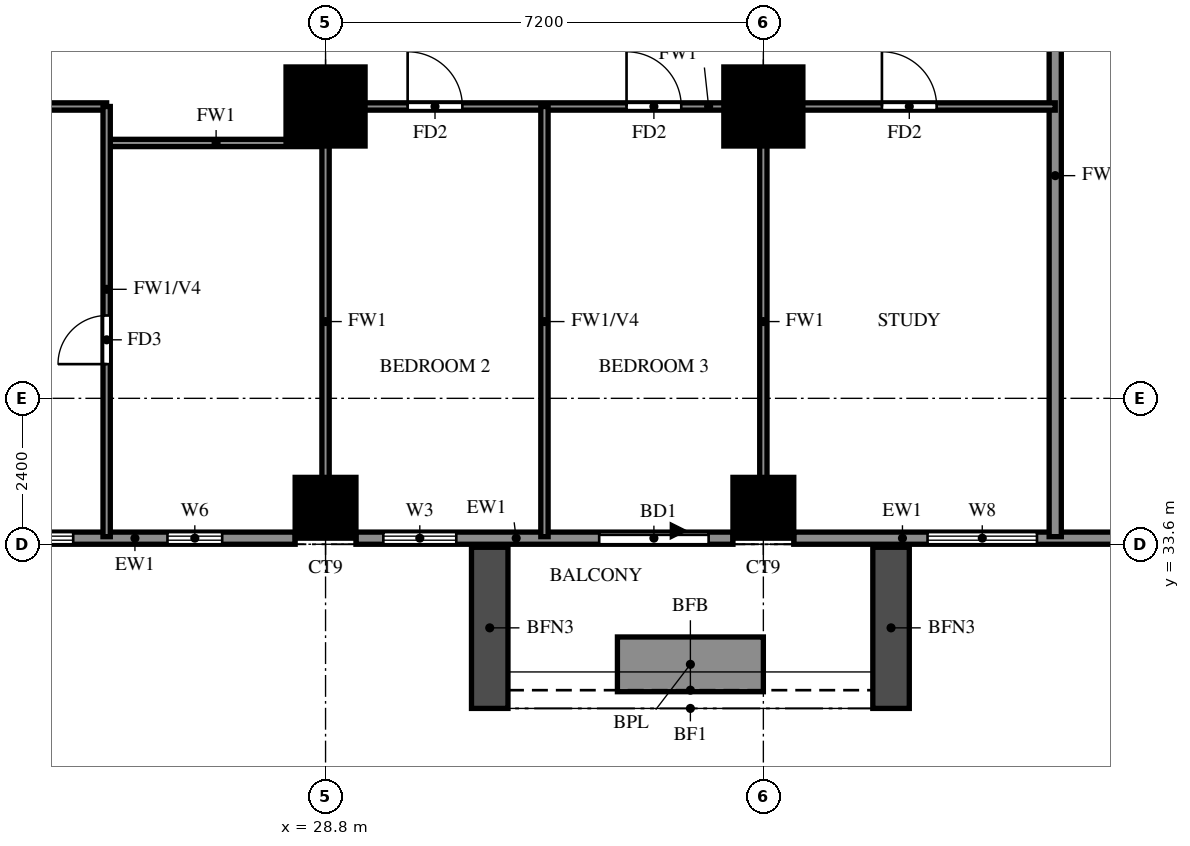
"""IFC4 building model, lengths in metres.
Left out: names, types, materials, properties, quantities, classifications, styles, units other than length and angle.
Written with IfcOpenShell. Run it as: python <this file> out.ifc"""

import sys

from ifc_helpers import new_model, si_unit, direction, frame, frame_2d, origin, origin_2d, place, context, subcontext, project, spatial, rectangle, extrude, source, transform, mapped, element, fill, save


model = new_model("IFC4")
c1 = context("Model", 3, precision=1e-05, world=origin(), true_north=direction((0.0, 1.0)))
c2 = subcontext(c1, "Body", "Model", "MODEL_VIEW")
j1 = project(units=[si_unit("LENGTHUNIT", "METRE"), si_unit("PLANEANGLEUNIT", "RADIAN")], contexts=[c1])
p1 = place(None, origin())
s1 = spatial("IfcSite", under=j1, at=p1, CompositionType="ELEMENT")
p2 = place(p1, origin())
s2 = spatial("IfcBuilding", under=s1, at=p2, CompositionType="ELEMENT")
p3 = place(p2, frame((0.0, 0.0, 79.5)))
s3 = spatial("IfcBuildingStorey", under=s2, at=p3, CompositionType="ELEMENT", Elevation=79.5)
m1 = source(origin(), c2, "Body", "SweptSolid", [
    extrude(rectangle(XDim=1.0, YDim=1.0, at=origin_2d()), origin(), (0.0, 0.0, 1.0), 3.18),
])
for number, where, z_axis, x_axis in (
    (1, (28.8, 34.2, 0.0), (0.0, 0.0, 1.0), (1.0, 0.0, 0.0)),
    (2, (36.0, 34.2, 0.0), (0.0, 0.0, 1.0), (1.0, 0.0, 0.0)),
):
    element("IfcColumn", number, at=place(p3, frame(where, z_axis=z_axis, x_axis=x_axis)), inside=s3, PredefinedType="COLUMN", context=c2, shape_type="MappedRepresentation", body=[
        mapped(m1, transform((0.0, 0.0, 0.0))),
    ])
m2 = source(origin(), c2, "Body", "SweptSolid", [
    extrude(rectangle(XDim=1.3, YDim=1.3, at=origin_2d()), origin(), (0.0, 0.0, 1.0), 3.18),
])
for number, where, z_axis, x_axis in (
    (3, (28.8, 40.8, 0.0), (0.0, 0.0, 1.0), (1.0, 0.0, 0.0)),
    (4, (36.0, 40.8, 0.0), (0.0, 0.0, 1.0), (1.0, 0.0, 0.0)),
):
    element("IfcColumn", number, at=place(p3, frame(where, z_axis=z_axis, x_axis=x_axis)), inside=s3, PredefinedType="COLUMN", context=c2, shape_type="MappedRepresentation", body=[
        mapped(m2, transform((0.0, 0.0, 0.0))),
    ])
p4 = place(p3, frame((22.1, 33.7, 0.0), z_axis=(0.0, 0.0, 1.0), x_axis=(1.0, 0.0, 0.0)))
e5 = element("IfcWall", 5, at=p4, inside=s3, PredefinedType="SOLIDWALL", context=c2, shape_type="SweptSolid", body=[
    extrude(rectangle(XDim=6.2, YDim=0.2, at=frame_2d((3.1, 0.0))), origin(), (0.0, 0.0, 1.0), 3.18),
])
p5 = place(p4, frame((0.75, 0.0, 0.6)))
e6 = element("IfcOpeningElement", 6, at=p5, cuts=e5, PredefinedType="OPENING", context=c2, shape_type="SweptSolid", body=[
    extrude(rectangle(XDim=1.8, YDim=2.4, at=frame_2d((0.9, 1.2))), frame((0.0, 0.11, 0.0), z_axis=(0.0, -1.0, 0.0), x_axis=(1.0, 0.0, 0.0)), (0.0, 0.0, 1.0), 0.22),
])
p6 = place(p4, frame((4.1, 0.0, 1.5)))
e7 = element("IfcOpeningElement", 7, at=p6, cuts=e5, PredefinedType="OPENING", context=c2, shape_type="SweptSolid", body=[
    extrude(rectangle(XDim=0.9, YDim=0.9, at=frame_2d((0.45, 0.45))), frame((0.0, 0.11, 0.0), z_axis=(0.0, -1.0, 0.0), x_axis=(1.0, 0.0, 0.0)), (0.0, 0.0, 1.0), 0.22),
])
p7 = place(p3, frame((29.3, 33.7, 0.0), z_axis=(0.0, 0.0, 1.0), x_axis=(1.0, 0.0, 0.0)))
e8 = element("IfcWall", 8, at=p7, inside=s3, PredefinedType="SOLIDWALL", context=c2, shape_type="SweptSolid", body=[
    extrude(rectangle(XDim=6.2, YDim=0.2, at=frame_2d((3.1, 0.0))), origin(), (0.0, 0.0, 1.0), 3.18),
])
p8 = place(p7, frame((4.0, 0.0, 0.0)))
e9 = element("IfcOpeningElement", 9, at=p8, cuts=e8, PredefinedType="OPENING", context=c2, shape_type="SweptSolid", body=[
    extrude(rectangle(XDim=1.8, YDim=2.4, at=frame_2d((0.9, 1.2))), frame((0.0, 0.11, 0.0), z_axis=(0.0, -1.0, 0.0), x_axis=(1.0, 0.0, 0.0)), (0.0, 0.0, 1.0), 0.22),
])
p9 = place(p7, frame((0.45, 0.0, 0.6)))
e10 = element("IfcOpeningElement", 10, at=p9, cuts=e8, PredefinedType="OPENING", context=c2, shape_type="SweptSolid", body=[
    extrude(rectangle(XDim=1.2, YDim=2.4, at=frame_2d((0.6, 1.2))), frame((0.0, 0.11, 0.0), z_axis=(0.0, -1.0, 0.0), x_axis=(1.0, 0.0, 0.0)), (0.0, 0.0, 1.0), 0.22),
])
p10 = place(p3, frame((36.5, 33.7, 0.0), z_axis=(0.0, 0.0, 1.0), x_axis=(1.0, 0.0, 0.0)))
e11 = element("IfcWall", 11, at=p10, inside=s3, PredefinedType="SOLIDWALL", context=c2, shape_type="SweptSolid", body=[
    extrude(rectangle(XDim=5.5, YDim=0.2, at=frame_2d((2.75, 0.0))), origin(), (0.0, 0.0, 1.0), 3.18),
])
p11 = place(p10, frame((2.2, 0.0, 0.6)))
e12 = element("IfcOpeningElement", 12, at=p11, cuts=e11, PredefinedType="OPENING", context=c2, shape_type="SweptSolid", body=[
    extrude(rectangle(XDim=1.8, YDim=2.4, at=frame_2d((0.9, 1.2))), frame((0.0, 0.11, 0.0), z_axis=(0.0, -1.0, 0.0), x_axis=(1.0, 0.0, 0.0)), (0.0, 0.0, 1.0), 0.22),
])
for number, where, z_axis, x_axis in (
    (13, (31.5, 33.55, 0.0), (0.0, 0.0, 1.0), (0.0, -1.0, 0.0)),
    (14, (38.1, 33.55, 0.0), (0.0, 0.0, 1.0), (0.0, -1.0, 0.0)),
):
    element("IfcWall", number, at=place(p3, frame(where, z_axis=z_axis, x_axis=x_axis)), inside=s3, PredefinedType="SOLIDWALL", context=c2, shape_type="SweptSolid", body=[
        extrude(rectangle(XDim=2.65, YDim=0.6, at=frame_2d((1.325, 0.0))), origin(), (0.0, 0.0, 1.0), 2.85),
    ])
p12 = place(p3, frame((33.6, 31.625, 0.0), z_axis=(0.0, 0.0, 1.0), x_axis=(1.0, 0.0, 0.0)))
e15 = element("IfcWall", 15, at=p12, inside=s3, PredefinedType="SOLIDWALL", context=c2, shape_type="SweptSolid", body=[
    extrude(rectangle(XDim=2.4, YDim=0.9, at=frame_2d((1.2, 0.0))), origin(), (0.0, 0.0, 1.0), 0.9),
])
p13 = place(p3, frame((40.8, 33.725, 0.0), z_axis=(0.0, 0.0, 1.0), x_axis=(0.0, 1.0, 0.0)))
e16 = element("IfcWall", 16, at=p13, inside=s3, PredefinedType="SOLIDWALL", context=c2, shape_type="SweptSolid", body=[
    extrude(rectangle(XDim=11.875, YDim=0.2, at=frame_2d((5.938, 0.0))), origin(), (0.0, 0.0, 1.0), 2.28),
])
p14 = place(p3, frame((25.2, 40.2, 0.0), z_axis=(0.0, 0.0, 1.0), x_axis=(1.0, 0.0, 0.0)))
e17 = element("IfcWall", 17, at=p14, inside=s3, PredefinedType="PARTITIONING", context=c2, shape_type="SweptSolid", body=[
    extrude(rectangle(XDim=3.6, YDim=0.12, at=frame_2d((1.8, 0.0))), origin(), (0.0, 0.0, 1.0), 3.18),
])
p15 = place(p3, frame((21.6, 40.8, 0.0), z_axis=(0.0, 0.0, 1.0), x_axis=(1.0, 0.0, 0.0)))
e18 = element("IfcWall", 18, at=p15, inside=s3, PredefinedType="PARTITIONING", context=c2, shape_type="SweptSolid", body=[
    extrude(rectangle(XDim=3.6, YDim=0.12, at=frame_2d((1.8, 0.0))), origin(), (0.0, 0.0, 1.0), 3.18),
])
p16 = place(p15, frame((1.35, 0.0, 0.0)))
e19 = element("IfcOpeningElement", 19, at=p16, cuts=e18, PredefinedType="OPENING", context=c2, shape_type="SweptSolid", body=[
    extrude(rectangle(XDim=0.9, YDim=2.1, at=frame_2d((0.45, 1.05))), frame((0.0, 0.07, 0.0), z_axis=(0.0, -1.0, 0.0), x_axis=(1.0, 0.0, 0.0)), (0.0, 0.0, 1.0), 0.14),
])
p17 = place(p3, frame((28.8, 40.8, 0.0), z_axis=(0.0, 0.0, 1.0), x_axis=(1.0, 0.0, 0.0)))
e20 = element("IfcWall", 20, at=p17, inside=s3, PredefinedType="PARTITIONING", context=c2, shape_type="SweptSolid", body=[
    extrude(rectangle(XDim=12.0, YDim=0.12, at=frame_2d((6.0, 0.0))), origin(), (0.0, 0.0, 1.0), 3.18),
])
p18 = place(p17, frame((1.35, 0.0, 0.0)))
e21 = element("IfcOpeningElement", 21, at=p18, cuts=e20, PredefinedType="OPENING", context=c2, shape_type="SweptSolid", body=[
    extrude(rectangle(XDim=0.9, YDim=2.1, at=frame_2d((0.45, 1.05))), frame((0.0, 0.07, 0.0), z_axis=(0.0, -1.0, 0.0), x_axis=(1.0, 0.0, 0.0)), (0.0, 0.0, 1.0), 0.14),
])
p19 = place(p17, frame((4.95, 0.0, 0.0)))
e22 = element("IfcOpeningElement", 22, at=p19, cuts=e20, PredefinedType="OPENING", context=c2, shape_type="SweptSolid", body=[
    extrude(rectangle(XDim=0.9, YDim=2.1, at=frame_2d((0.45, 1.05))), frame((0.0, 0.07, 0.0), z_axis=(0.0, -1.0, 0.0), x_axis=(1.0, 0.0, 0.0)), (0.0, 0.0, 1.0), 0.14),
])
p20 = place(p17, frame((9.15, 0.0, 0.0)))
e23 = element("IfcOpeningElement", 23, at=p20, cuts=e20, PredefinedType="OPENING", context=c2, shape_type="SweptSolid", body=[
    extrude(rectangle(XDim=0.9, YDim=2.1, at=frame_2d((0.45, 1.05))), frame((0.0, 0.07, 0.0), z_axis=(0.0, -1.0, 0.0), x_axis=(1.0, 0.0, 0.0)), (0.0, 0.0, 1.0), 0.14),
])
p21 = place(p3, frame((25.2, 33.725, 0.0), z_axis=(0.0, 0.0, 1.0), x_axis=(0.0, 1.0, 0.0)))
e24 = element("IfcWall", 24, at=p21, inside=s3, PredefinedType="PARTITIONING", context=c2, shape_type="SweptSolid", body=[
    extrude(rectangle(XDim=7.075, YDim=0.12, at=frame_2d((3.538, 0.0))), origin(), (0.0, 0.0, 1.0), 2.28),
])
p22 = place(p21, frame((2.837, 0.0, 0.0)))
e25 = element("IfcOpeningElement", 25, at=p22, cuts=e24, PredefinedType="OPENING", context=c2, shape_type="SweptSolid", body=[
    extrude(rectangle(XDim=0.8, YDim=2.1, at=frame_2d((0.4, 1.05))), frame((0.0, 0.07, 0.0), z_axis=(0.0, -1.0, 0.0), x_axis=(1.0, 0.0, 0.0)), (0.0, 0.0, 1.0), 0.14),
])
p23 = place(p3, frame((28.8, 33.725, 0.0), z_axis=(0.0, 0.0, 1.0), x_axis=(0.0, 1.0, 0.0)))
e26 = element("IfcWall", 26, at=p23, inside=s3, PredefinedType="PARTITIONING", context=c2, shape_type="SweptSolid", body=[
    extrude(rectangle(XDim=7.075, YDim=0.12, at=frame_2d((3.538, 0.0))), origin(), (0.0, 0.0, 1.0), 3.18),
])
p24 = place(p3, frame((32.4, 33.725, 0.0), z_axis=(0.0, 0.0, 1.0), x_axis=(0.0, 1.0, 0.0)))
e27 = element("IfcWall", 27, at=p24, inside=s3, PredefinedType="PARTITIONING", context=c2, shape_type="SweptSolid", body=[
    extrude(rectangle(XDim=7.075, YDim=0.12, at=frame_2d((3.538, 0.0))), origin(), (0.0, 0.0, 1.0), 2.28),
])
p25 = place(p3, frame((36.0, 33.725, 0.0), z_axis=(0.0, 0.0, 1.0), x_axis=(0.0, 1.0, 0.0)))
e28 = element("IfcWall", 28, at=p25, inside=s3, PredefinedType="PARTITIONING", context=c2, shape_type="SweptSolid", body=[
    extrude(rectangle(XDim=7.075, YDim=0.12, at=frame_2d((3.538, 0.0))), origin(), (0.0, 0.0, 1.0), 3.18),
])
p26 = place(p5, origin())
e29 = element("IfcWindow", 29, at=p26, inside=s3, PartitioningType="DOUBLE_PANEL_VERTICAL", PredefinedType="WINDOW", context=c2, shape_type="SweptSolid", body=[
    extrude(rectangle(XDim=1.8, YDim=2.4, at=frame_2d((0.9, 1.2))), frame((0.0, 0.03, 0.0), z_axis=(0.0, -1.0, 0.0), x_axis=(1.0, 0.0, 0.0)), (0.0, 0.0, 1.0), 0.06),
])
fill(e6, e29)
p27 = place(p6, origin())
e30 = element("IfcWindow", 30, at=p27, inside=s3, PartitioningType="SINGLE_PANEL", PredefinedType="WINDOW", context=c2, shape_type="SweptSolid", body=[
    extrude(rectangle(XDim=0.9, YDim=0.9, at=frame_2d((0.45, 0.45))), frame((0.0, 0.03, 0.0), z_axis=(0.0, -1.0, 0.0), x_axis=(1.0, 0.0, 0.0)), (0.0, 0.0, 1.0), 0.06),
])
fill(e7, e30)
p28 = place(p8, origin())
e31 = element("IfcDoor", 31, at=p28, inside=s3, OperationType="DOUBLE_DOOR_SLIDING", PredefinedType="DOOR", context=c2, shape_type="SweptSolid", body=[
    extrude(rectangle(XDim=1.8, YDim=2.4, at=frame_2d((0.9, 1.2))), frame((0.0, 0.025, 0.0), z_axis=(0.0, -1.0, 0.0), x_axis=(1.0, 0.0, 0.0)), (0.0, 0.0, 1.0), 0.05),
])
fill(e9, e31)
p29 = place(p9, origin())
e32 = element("IfcWindow", 32, at=p29, inside=s3, PartitioningType="SINGLE_PANEL", PredefinedType="WINDOW", context=c2, shape_type="SweptSolid", body=[
    extrude(rectangle(XDim=1.2, YDim=2.4, at=frame_2d((0.6, 1.2))), frame((0.0, 0.03, 0.0), z_axis=(0.0, -1.0, 0.0), x_axis=(1.0, 0.0, 0.0)), (0.0, 0.0, 1.0), 0.06),
])
fill(e10, e32)
p30 = place(p11, origin())
e33 = element("IfcWindow", 33, at=p30, inside=s3, PartitioningType="DOUBLE_PANEL_VERTICAL", PredefinedType="WINDOW", context=c2, shape_type="SweptSolid", body=[
    extrude(rectangle(XDim=1.8, YDim=2.4, at=frame_2d((0.9, 1.2))), frame((0.0, 0.03, 0.0), z_axis=(0.0, -1.0, 0.0), x_axis=(1.0, 0.0, 0.0)), (0.0, 0.0, 1.0), 0.06),
])
fill(e12, e33)
p31 = place(p22, origin())
e34 = element("IfcDoor", 34, at=p31, inside=s3, OperationType="SINGLE_SWING_LEFT", PredefinedType="DOOR", context=c2, shape_type="SweptSolid", body=[
    extrude(rectangle(XDim=0.8, YDim=2.1, at=frame_2d((0.4, 1.05))), frame((0.0, 0.025, 0.0), z_axis=(0.0, -1.0, 0.0), x_axis=(1.0, 0.0, 0.0)), (0.0, 0.0, 1.0), 0.05),
])
fill(e25, e34)
p32 = place(p18, origin())
e35 = element("IfcDoor", 35, at=p32, inside=s3, OperationType="SINGLE_SWING_RIGHT", PredefinedType="DOOR", context=c2, shape_type="SweptSolid", body=[
    extrude(rectangle(XDim=0.9, YDim=2.1, at=frame_2d((0.45, 1.05))), frame((0.0, 0.025, 0.0), z_axis=(0.0, -1.0, 0.0), x_axis=(1.0, 0.0, 0.0)), (0.0, 0.0, 1.0), 0.05),
])
fill(e21, e35)
p33 = place(p19, origin())
e36 = element("IfcDoor", 36, at=p33, inside=s3, OperationType="SINGLE_SWING_LEFT", PredefinedType="DOOR", context=c2, shape_type="SweptSolid", body=[
    extrude(rectangle(XDim=0.9, YDim=2.1, at=frame_2d((0.45, 1.05))), frame((0.0, 0.025, 0.0), z_axis=(0.0, -1.0, 0.0), x_axis=(1.0, 0.0, 0.0)), (0.0, 0.0, 1.0), 0.05),
])
fill(e22, e36)
p34 = place(p20, origin())
e37 = element("IfcDoor", 37, at=p34, inside=s3, OperationType="SINGLE_SWING_LEFT", PredefinedType="DOOR", context=c2, shape_type="SweptSolid", body=[
    extrude(rectangle(XDim=0.9, YDim=2.1, at=frame_2d((0.45, 1.05))), frame((0.0, 0.025, 0.0), z_axis=(0.0, -1.0, 0.0), x_axis=(1.0, 0.0, 0.0)), (0.0, 0.0, 1.0), 0.05),
])
fill(e23, e37)
save(model, sys.argv[1])
